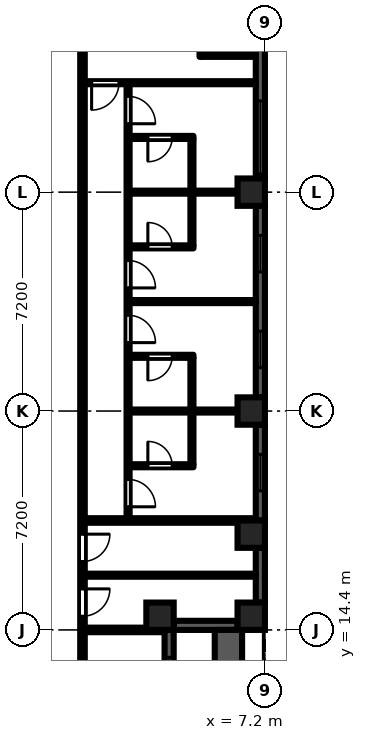
"""IFC4 building model, lengths in metres.
Left out: names, types, materials, properties, quantities, classifications, styles, units other than length and angle.
Written with IfcOpenShell. Run it as: python <this file> out.ifc"""

import sys

from ifc_helpers import new_model, si_unit, direction, frame, frame_2d, origin, origin_2d, place, context, subcontext, project, spatial, rectangle, extrude, element, fill, save


model = new_model("IFC4")
c1 = context("Model", 3, precision=1e-05, world=origin(), true_north=direction((0.0, 1.0)))
c2 = subcontext(c1, "Body", "Model", "MODEL_VIEW")
j1 = project(units=[si_unit("LENGTHUNIT", "METRE"), si_unit("PLANEANGLEUNIT", "RADIAN")], contexts=[c1])
p1 = place(None, origin())
s1 = spatial("IfcSite", under=j1, at=p1, CompositionType="ELEMENT")
p2 = place(p1, origin())
s2 = spatial("IfcBuilding", under=s1, at=p2, CompositionType="ELEMENT")
p3 = place(p2, frame((0.0, 0.0, 53.7)))
s3 = spatial("IfcBuildingStorey", under=s2, at=p3, CompositionType="ELEMENT", Elevation=53.7)
for number, where, z_axis, x_axis in (
    (1, (3.75, 14.85, 0.0), (0.0, 0.0, 1.0), (1.0, 0.0, 0.0)),
    (2, (6.75, 14.85, 0.0), (0.0, 0.0, 1.0), (1.0, 0.0, 0.0)),
    (3, (6.75, 17.55, 0.0), (0.0, 0.0, 1.0), (1.0, 0.0, 0.0)),
    (4, (6.75, 21.6, 0.0), (0.0, 0.0, 1.0), (1.0, 0.0, 0.0)),
    (5, (6.75, 28.8, 0.0), (0.0, 0.0, 1.0), (1.0, 0.0, 0.0)),
):
    element("IfcColumn", number, at=place(p3, frame(where, z_axis=z_axis, x_axis=x_axis)), inside=s3, PredefinedType="COLUMN", context=c2, shape_type="SweptSolid", body=[
        extrude(rectangle(XDim=0.9, YDim=0.9, at=origin_2d()), origin(), (0.0, 0.0, 1.0), 3.0),
    ])
p4 = place(p3, frame((4.05, 7.2, 0.0), z_axis=(0.0, 0.0, 1.0), x_axis=(0.0, 1.0, 0.0)))
e6 = element("IfcWall", 6, at=p4, inside=s3, PredefinedType="SOLIDWALL", context=c2, shape_type="SweptSolid", body=[
    extrude(rectangle(XDim=7.2, YDim=0.3, at=frame_2d((3.6, 0.0))), origin(), (0.0, 0.0, 1.0), 2.1),
])
p5 = place(p4, frame((3.0, 0.0, 0.0)))
e7 = element("IfcOpeningElement", 7, at=p5, cuts=e6, PredefinedType="OPENING", context=c2, shape_type="SweptSolid", body=[
    extrude(rectangle(XDim=1.2, YDim=2.05, at=frame_2d((0.6, 1.025))), frame((0.0, 0.16, 0.0), z_axis=(0.0, -1.0, 0.0), x_axis=(1.0, 0.0, 0.0)), (0.0, 0.0, 1.0), 0.32),
])
p6 = place(p4, frame((0.9, 0.0, 0.2)))
e8 = element("IfcOpeningElement", 8, at=p6, cuts=e6, PredefinedType="OPENING", context=c2, shape_type="SweptSolid", body=[
    extrude(rectangle(XDim=1.8, YDim=1.85, at=frame_2d((0.9, 0.925))), frame((0.0, 0.16, 0.0), z_axis=(0.0, -1.0, 0.0), x_axis=(1.0, 0.0, 0.0)), (0.0, 0.0, 1.0), 0.32),
])
p7 = place(p4, frame((4.5, 0.0, 0.2)))
e9 = element("IfcOpeningElement", 9, at=p7, cuts=e6, PredefinedType="OPENING", context=c2, shape_type="SweptSolid", body=[
    extrude(rectangle(XDim=1.8, YDim=1.85, at=frame_2d((0.9, 0.925))), frame((0.0, 0.16, 0.0), z_axis=(0.0, -1.0, 0.0), x_axis=(1.0, 0.0, 0.0)), (0.0, 0.0, 1.0), 0.32),
])
p8 = place(p3, frame((4.2, 14.55, 0.0), z_axis=(0.0, 0.0, 1.0), x_axis=(1.0, 0.0, 0.0)))
e10 = element("IfcWall", 10, at=p8, inside=s3, PredefinedType="SOLIDWALL", context=c2, shape_type="SweptSolid", body=[
    extrude(rectangle(XDim=2.1, YDim=0.3, at=frame_2d((1.05, 0.0))), origin(), (0.0, 0.0, 1.0), 2.1),
])
p9 = place(p3, frame((7.05, 15.3, 0.0), z_axis=(0.0, 0.0, 1.0), x_axis=(0.0, 1.0, 0.0)))
e11 = element("IfcWall", 11, at=p9, inside=s3, PredefinedType="SOLIDWALL", context=c2, shape_type="SweptSolid", body=[
    extrude(rectangle(XDim=1.8, YDim=0.3, at=frame_2d((0.9, 0.0))), origin(), (0.0, 0.0, 1.0), 2.1),
])
p10 = place(p3, frame((7.05, 18.0, 0.0), z_axis=(0.0, 0.0, 1.0), x_axis=(0.0, 1.0, 0.0)))
e12 = element("IfcWall", 12, at=p10, inside=s3, PredefinedType="SOLIDWALL", context=c2, shape_type="SweptSolid", body=[
    extrude(rectangle(XDim=3.15, YDim=0.3, at=frame_2d((1.575, 0.0))), origin(), (0.0, 0.0, 1.0), 2.1),
])
p11 = place(p10, frame((0.975, 0.0, 0.2)))
e13 = element("IfcOpeningElement", 13, at=p11, cuts=e12, PredefinedType="OPENING", context=c2, shape_type="SweptSolid", body=[
    extrude(rectangle(XDim=1.2, YDim=1.85, at=frame_2d((0.6, 0.925))), frame((0.0, 0.16, 0.0), z_axis=(0.0, -1.0, 0.0), x_axis=(1.0, 0.0, 0.0)), (0.0, 0.0, 1.0), 0.32),
])
p12 = place(p3, frame((7.05, 22.05, 0.0), z_axis=(0.0, 0.0, 1.0), x_axis=(0.0, 1.0, 0.0)))
e14 = element("IfcWall", 14, at=p12, inside=s3, PredefinedType="SOLIDWALL", context=c2, shape_type="SweptSolid", body=[
    extrude(rectangle(XDim=6.3, YDim=0.3, at=frame_2d((3.15, 0.0))), origin(), (0.0, 0.0, 1.0), 2.1),
])
p13 = place(p12, frame((0.975, 0.0, 0.2)))
e15 = element("IfcOpeningElement", 15, at=p13, cuts=e14, PredefinedType="OPENING", context=c2, shape_type="SweptSolid", body=[
    extrude(rectangle(XDim=1.2, YDim=1.85, at=frame_2d((0.6, 0.925))), frame((0.0, 0.16, 0.0), z_axis=(0.0, -1.0, 0.0), x_axis=(1.0, 0.0, 0.0)), (0.0, 0.0, 1.0), 0.32),
])
p14 = place(p12, frame((4.125, 0.0, 0.2)))
e16 = element("IfcOpeningElement", 16, at=p14, cuts=e14, PredefinedType="OPENING", context=c2, shape_type="SweptSolid", body=[
    extrude(rectangle(XDim=1.2, YDim=1.85, at=frame_2d((0.6, 0.925))), frame((0.0, 0.16, 0.0), z_axis=(0.0, -1.0, 0.0), x_axis=(1.0, 0.0, 0.0)), (0.0, 0.0, 1.0), 0.32),
])
p15 = place(p3, frame((7.05, 29.25, 0.0), z_axis=(0.0, 0.0, 1.0), x_axis=(0.0, 1.0, 0.0)))
e17 = element("IfcWall", 17, at=p15, inside=s3, PredefinedType="SOLIDWALL", context=c2, shape_type="SweptSolid", body=[
    extrude(rectangle(XDim=6.3, YDim=0.3, at=frame_2d((3.15, 0.0))), origin(), (0.0, 0.0, 1.0), 2.1),
])
p16 = place(p15, frame((0.15, 0.0, 0.2)))
e18 = element("IfcOpeningElement", 18, at=p16, cuts=e17, PredefinedType="OPENING", context=c2, shape_type="SweptSolid", body=[
    extrude(rectangle(XDim=2.4, YDim=1.85, at=frame_2d((1.2, 0.925))), frame((0.0, 0.16, 0.0), z_axis=(0.0, -1.0, 0.0), x_axis=(1.0, 0.0, 0.0)), (0.0, 0.0, 1.0), 0.32),
])
p17 = place(p3, frame((6.0, 7.2, 0.0), z_axis=(0.0, 0.0, 1.0), x_axis=(0.0, 1.0, 0.0)))
e19 = element("IfcWall", 19, at=p17, inside=s3, PredefinedType="PARAPET", context=c2, shape_type="SweptSolid", body=[
    extrude(rectangle(XDim=7.2, YDim=0.9, at=frame_2d((3.6, 0.0))), origin(), (0.0, 0.0, 1.0), 0.8),
])
p18 = place(p3, frame((1.2, 1.125, 0.0), z_axis=(0.0, 0.0, 1.0), x_axis=(0.0, 1.0, 0.0)))
e20 = element("IfcWall", 20, at=p18, inside=s3, PredefinedType="PARTITIONING", context=c2, shape_type="SweptSolid", body=[
    extrude(rectangle(XDim=35.375, YDim=0.15, at=frame_2d((17.688, 0.0))), origin(), (0.0, 0.0, 1.0), 2.575),
])
p19 = place(p18, frame((2.625, 0.0, 0.0)))
e21 = element("IfcOpeningElement", 21, at=p19, cuts=e20, PredefinedType="OPENING", context=c2, shape_type="SweptSolid", body=[
    extrude(rectangle(XDim=0.9, YDim=2.1, at=frame_2d((0.45, 1.05))), frame((0.0, 0.085, 0.0), z_axis=(0.0, -1.0, 0.0), x_axis=(1.0, 0.0, 0.0)), (0.0, 0.0, 1.0), 0.17),
])
p20 = place(p18, frame((7.425, 0.0, 0.0)))
e22 = element("IfcOpeningElement", 22, at=p20, cuts=e20, PredefinedType="OPENING", context=c2, shape_type="SweptSolid", body=[
    extrude(rectangle(XDim=0.9, YDim=2.1, at=frame_2d((0.45, 1.05))), frame((0.0, 0.085, 0.0), z_axis=(0.0, -1.0, 0.0), x_axis=(1.0, 0.0, 0.0)), (0.0, 0.0, 1.0), 0.17),
])
p21 = place(p18, frame((13.725, 0.0, 0.0)))
e23 = element("IfcOpeningElement", 23, at=p21, cuts=e20, PredefinedType="OPENING", context=c2, shape_type="SweptSolid", body=[
    extrude(rectangle(XDim=0.9, YDim=2.1, at=frame_2d((0.45, 1.05))), frame((0.0, 0.085, 0.0), z_axis=(0.0, -1.0, 0.0), x_axis=(1.0, 0.0, 0.0)), (0.0, 0.0, 1.0), 0.17),
])
p22 = place(p18, frame((15.525, 0.0, 0.0)))
e24 = element("IfcOpeningElement", 24, at=p22, cuts=e20, PredefinedType="OPENING", context=c2, shape_type="SweptSolid", body=[
    extrude(rectangle(XDim=0.9, YDim=2.1, at=frame_2d((0.45, 1.05))), frame((0.0, 0.085, 0.0), z_axis=(0.0, -1.0, 0.0), x_axis=(1.0, 0.0, 0.0)), (0.0, 0.0, 1.0), 0.17),
])
p23 = place(p18, frame((32.825, 0.0, 0.0)))
e25 = element("IfcOpeningElement", 25, at=p23, cuts=e20, PredefinedType="OPENING", context=c2, shape_type="SweptSolid", body=[
    extrude(rectangle(XDim=1.0, YDim=2.1, at=frame_2d((0.5, 1.05))), frame((0.0, 0.085, 0.0), z_axis=(0.0, -1.0, 0.0), x_axis=(1.0, 0.0, 0.0)), (0.0, 0.0, 1.0), 0.17),
])
p24 = place(p3, frame((1.275, 14.4, 0.0), z_axis=(0.0, 0.0, 1.0), x_axis=(1.0, 0.0, 0.0)))
e26 = element("IfcWall", 26, at=p24, inside=s3, PredefinedType="PARTITIONING", context=c2, shape_type="SweptSolid", body=[
    extrude(rectangle(XDim=2.625, YDim=0.15, at=frame_2d((1.312, 0.0))), origin(), (0.0, 0.0, 1.0), 2.575),
])
p25 = place(p3, frame((1.275, 16.2, 0.0), z_axis=(0.0, 0.0, 1.0), x_axis=(1.0, 0.0, 0.0)))
e27 = element("IfcWall", 27, at=p25, inside=s3, PredefinedType="PARTITIONING", context=c2, shape_type="SweptSolid", body=[
    extrude(rectangle(XDim=5.625, YDim=0.1, at=frame_2d((2.812, 0.0))), origin(), (0.0, 0.0, 1.0), 2.575),
])
p26 = place(p3, frame((1.275, 18.0, 0.0), z_axis=(0.0, 0.0, 1.0), x_axis=(1.0, 0.0, 0.0)))
e28 = element("IfcWall", 28, at=p26, inside=s3, PredefinedType="PARTITIONING", context=c2, shape_type="SweptSolid", body=[
    extrude(rectangle(XDim=5.625, YDim=0.15, at=frame_2d((2.812, 0.0))), origin(), (0.0, 0.0, 1.0), 2.575),
])
p27 = place(p3, frame((1.275, 32.4, 0.0), z_axis=(0.0, 0.0, 1.0), x_axis=(1.0, 0.0, 0.0)))
e29 = element("IfcWall", 29, at=p27, inside=s3, PredefinedType="PARTITIONING", context=c2, shape_type="SweptSolid", body=[
    extrude(rectangle(XDim=5.625, YDim=0.1, at=frame_2d((2.812, 0.0))), origin(), (0.0, 0.0, 1.0), 2.575),
])
p28 = place(p27, frame((0.225, 0.0, 0.0)))
e30 = element("IfcOpeningElement", 30, at=p28, cuts=e29, PredefinedType="OPENING", context=c2, shape_type="SweptSolid", body=[
    extrude(rectangle(XDim=0.9, YDim=2.1, at=frame_2d((0.45, 1.05))), frame((0.0, 0.06, 0.0), z_axis=(0.0, -1.0, 0.0), x_axis=(1.0, 0.0, 0.0)), (0.0, 0.0, 1.0), 0.12),
])
p29 = place(p3, frame((2.7, 18.075, 0.0), z_axis=(0.0, 0.0, 1.0), x_axis=(0.0, 1.0, 0.0)))
e31 = element("IfcWall", 31, at=p29, inside=s3, PredefinedType="PARTITIONING", context=c2, shape_type="SweptSolid", body=[
    extrude(rectangle(XDim=14.275, YDim=0.1, at=frame_2d((7.138, 0.0))), origin(), (0.0, 0.0, 1.0), 2.575),
])
p30 = place(p29, frame((0.375, 0.0, 0.0)))
e32 = element("IfcOpeningElement", 32, at=p30, cuts=e31, PredefinedType="OPENING", context=c2, shape_type="SweptSolid", body=[
    extrude(rectangle(XDim=0.9, YDim=2.1, at=frame_2d((0.45, 1.05))), frame((0.0, 0.06, 0.0), z_axis=(0.0, -1.0, 0.0), x_axis=(1.0, 0.0, 0.0)), (0.0, 0.0, 1.0), 0.12),
])
p31 = place(p29, frame((5.775, 0.0, 0.0)))
e33 = element("IfcOpeningElement", 33, at=p31, cuts=e31, PredefinedType="OPENING", context=c2, shape_type="SweptSolid", body=[
    extrude(rectangle(XDim=0.9, YDim=2.1, at=frame_2d((0.45, 1.05))), frame((0.0, 0.06, 0.0), z_axis=(0.0, -1.0, 0.0), x_axis=(1.0, 0.0, 0.0)), (0.0, 0.0, 1.0), 0.12),
])
p32 = place(p29, frame((7.575, 0.0, 0.0)))
e34 = element("IfcOpeningElement", 34, at=p32, cuts=e31, PredefinedType="OPENING", context=c2, shape_type="SweptSolid", body=[
    extrude(rectangle(XDim=0.9, YDim=2.1, at=frame_2d((0.45, 1.05))), frame((0.0, 0.06, 0.0), z_axis=(0.0, -1.0, 0.0), x_axis=(1.0, 0.0, 0.0)), (0.0, 0.0, 1.0), 0.12),
])
p33 = place(p29, frame((12.975, 0.0, 0.0)))
e35 = element("IfcOpeningElement", 35, at=p33, cuts=e31, PredefinedType="OPENING", context=c2, shape_type="SweptSolid", body=[
    extrude(rectangle(XDim=0.9, YDim=2.1, at=frame_2d((0.45, 1.05))), frame((0.0, 0.06, 0.0), z_axis=(0.0, -1.0, 0.0), x_axis=(1.0, 0.0, 0.0)), (0.0, 0.0, 1.0), 0.12),
])
p34 = place(p3, frame((2.75, 19.8, 0.0), z_axis=(0.0, 0.0, 1.0), x_axis=(1.0, 0.0, 0.0)))
e36 = element("IfcWall", 36, at=p34, inside=s3, PredefinedType="PARTITIONING", context=c2, shape_type="SweptSolid", body=[
    extrude(rectangle(XDim=2.1, YDim=0.1, at=frame_2d((1.05, 0.0))), origin(), (0.0, 0.0, 1.0), 2.575),
])
p35 = place(p34, frame((0.6, 0.0, 0.0)))
e37 = element("IfcOpeningElement", 37, at=p35, cuts=e36, PredefinedType="OPENING", context=c2, shape_type="SweptSolid", body=[
    extrude(rectangle(XDim=0.8, YDim=2.1, at=frame_2d((0.4, 1.05))), frame((0.0, 0.06, 0.0), z_axis=(0.0, -1.0, 0.0), x_axis=(1.0, 0.0, 0.0)), (0.0, 0.0, 1.0), 0.12),
])
p36 = place(p3, frame((2.75, 21.6, 0.0), z_axis=(0.0, 0.0, 1.0), x_axis=(1.0, 0.0, 0.0)))
e38 = element("IfcWall", 38, at=p36, inside=s3, PredefinedType="PARTITIONING", context=c2, shape_type="SweptSolid", body=[
    extrude(rectangle(XDim=4.15, YDim=0.1, at=frame_2d((2.075, 0.0))), origin(), (0.0, 0.0, 1.0), 2.575),
])
p37 = place(p3, frame((2.75, 23.4, 0.0), z_axis=(0.0, 0.0, 1.0), x_axis=(1.0, 0.0, 0.0)))
e39 = element("IfcWall", 39, at=p37, inside=s3, PredefinedType="PARTITIONING", context=c2, shape_type="SweptSolid", body=[
    extrude(rectangle(XDim=2.1, YDim=0.1, at=frame_2d((1.05, 0.0))), origin(), (0.0, 0.0, 1.0), 2.575),
])
p38 = place(p37, frame((0.6, 0.0, 0.0)))
e40 = element("IfcOpeningElement", 40, at=p38, cuts=e39, PredefinedType="OPENING", context=c2, shape_type="SweptSolid", body=[
    extrude(rectangle(XDim=0.8, YDim=2.1, at=frame_2d((0.4, 1.05))), frame((0.0, 0.06, 0.0), z_axis=(0.0, -1.0, 0.0), x_axis=(1.0, 0.0, 0.0)), (0.0, 0.0, 1.0), 0.12),
])
p39 = place(p3, frame((2.75, 25.2, 0.0), z_axis=(0.0, 0.0, 1.0), x_axis=(1.0, 0.0, 0.0)))
e41 = element("IfcWall", 41, at=p39, inside=s3, PredefinedType="PARTITIONING", context=c2, shape_type="SweptSolid", body=[
    extrude(rectangle(XDim=4.15, YDim=0.1, at=frame_2d((2.075, 0.0))), origin(), (0.0, 0.0, 1.0), 2.575),
])
p40 = place(p3, frame((2.75, 27.0, 0.0), z_axis=(0.0, 0.0, 1.0), x_axis=(1.0, 0.0, 0.0)))
e42 = element("IfcWall", 42, at=p40, inside=s3, PredefinedType="PARTITIONING", context=c2, shape_type="SweptSolid", body=[
    extrude(rectangle(XDim=2.1, YDim=0.1, at=frame_2d((1.05, 0.0))), origin(), (0.0, 0.0, 1.0), 2.575),
])
p41 = place(p40, frame((0.6, 0.0, 0.0)))
e43 = element("IfcOpeningElement", 43, at=p41, cuts=e42, PredefinedType="OPENING", context=c2, shape_type="SweptSolid", body=[
    extrude(rectangle(XDim=0.8, YDim=2.1, at=frame_2d((0.4, 1.05))), frame((0.0, 0.06, 0.0), z_axis=(0.0, -1.0, 0.0), x_axis=(1.0, 0.0, 0.0)), (0.0, 0.0, 1.0), 0.12),
])
p42 = place(p3, frame((2.75, 28.8, 0.0), z_axis=(0.0, 0.0, 1.0), x_axis=(1.0, 0.0, 0.0)))
e44 = element("IfcWall", 44, at=p42, inside=s3, PredefinedType="PARTITIONING", context=c2, shape_type="SweptSolid", body=[
    extrude(rectangle(XDim=4.15, YDim=0.1, at=frame_2d((2.075, 0.0))), origin(), (0.0, 0.0, 1.0), 2.575),
])
p43 = place(p3, frame((2.75, 30.6, 0.0), z_axis=(0.0, 0.0, 1.0), x_axis=(1.0, 0.0, 0.0)))
e45 = element("IfcWall", 45, at=p43, inside=s3, PredefinedType="PARTITIONING", context=c2, shape_type="SweptSolid", body=[
    extrude(rectangle(XDim=2.1, YDim=0.1, at=frame_2d((1.05, 0.0))), origin(), (0.0, 0.0, 1.0), 2.575),
])
p44 = place(p43, frame((0.6, 0.0, 0.0)))
e46 = element("IfcOpeningElement", 46, at=p44, cuts=e45, PredefinedType="OPENING", context=c2, shape_type="SweptSolid", body=[
    extrude(rectangle(XDim=0.8, YDim=2.1, at=frame_2d((0.4, 1.05))), frame((0.0, 0.06, 0.0), z_axis=(0.0, -1.0, 0.0), x_axis=(1.0, 0.0, 0.0)), (0.0, 0.0, 1.0), 0.12),
])
for number, where, z_axis, x_axis in (
    (47, (4.8, 19.85, 0.0), (0.0, 0.0, 1.0), (0.0, 1.0, 0.0)),
    (48, (4.8, 27.05, 0.0), (0.0, 0.0, 1.0), (0.0, 1.0, 0.0)),
):
    element("IfcWall", number, at=place(p3, frame(where, z_axis=z_axis, x_axis=x_axis)), inside=s3, PredefinedType="PARTITIONING", context=c2, shape_type="SweptSolid", body=[
        extrude(rectangle(XDim=3.5, YDim=0.1, at=frame_2d((1.75, 0.0))), origin(), (0.0, 0.0, 1.0), 2.575),
    ])
p45 = place(p3, frame((5.1, 33.25, 0.0), z_axis=(0.0, 0.0, 1.0), x_axis=(0.0, 1.0, 0.0)))
e49 = element("IfcWall", 49, at=p45, inside=s3, PredefinedType="PARTITIONING", context=c2, shape_type="SweptSolid", body=[
    extrude(rectangle(XDim=1.9, YDim=0.1, at=frame_2d((0.95, 0.0))), origin(), (0.0, 0.0, 1.0), 2.575),
])
p46 = place(p45, frame((0.55, 0.0, 0.0)))
e50 = element("IfcOpeningElement", 50, at=p46, cuts=e49, PredefinedType="OPENING", context=c2, shape_type="SweptSolid", body=[
    extrude(rectangle(XDim=0.8, YDim=2.1, at=frame_2d((0.4, 1.05))), frame((0.0, 0.06, 0.0), z_axis=(0.0, -1.0, 0.0), x_axis=(1.0, 0.0, 0.0)), (0.0, 0.0, 1.0), 0.12),
])
p47 = place(p3, frame((5.15, 33.3, 0.0), z_axis=(0.0, 0.0, 1.0), x_axis=(1.0, 0.0, 0.0)))
e51 = element("IfcWall", 51, at=p47, inside=s3, PredefinedType="PARTITIONING", context=c2, shape_type="SweptSolid", body=[
    extrude(rectangle(XDim=1.75, YDim=0.1, at=frame_2d((0.875, 0.0))), origin(), (0.0, 0.0, 1.0), 2.575),
])
p48 = place(p7, origin())
e52 = element("IfcWindow", 52, at=p48, inside=s3, PartitioningType="SINGLE_PANEL", PredefinedType="WINDOW", context=c2, shape_type="SweptSolid", body=[
    extrude(rectangle(XDim=1.8, YDim=1.85, at=frame_2d((0.9, 0.925))), frame((0.0, 0.03, 0.0), z_axis=(0.0, -1.0, 0.0), x_axis=(1.0, 0.0, 0.0)), (0.0, 0.0, 1.0), 0.06),
])
fill(e9, e52)
p49 = place(p11, origin())
e53 = element("IfcWindow", 53, at=p49, inside=s3, PartitioningType="SINGLE_PANEL", PredefinedType="WINDOW", context=c2, shape_type="SweptSolid", body=[
    extrude(rectangle(XDim=1.2, YDim=1.85, at=frame_2d((0.6, 0.925))), frame((0.0, 0.03, 0.0), z_axis=(0.0, -1.0, 0.0), x_axis=(1.0, 0.0, 0.0)), (0.0, 0.0, 1.0), 0.06),
])
fill(e13, e53)
p50 = place(p13, origin())
e54 = element("IfcWindow", 54, at=p50, inside=s3, PartitioningType="SINGLE_PANEL", PredefinedType="WINDOW", context=c2, shape_type="SweptSolid", body=[
    extrude(rectangle(XDim=1.2, YDim=1.85, at=frame_2d((0.6, 0.925))), frame((0.0, 0.03, 0.0), z_axis=(0.0, -1.0, 0.0), x_axis=(1.0, 0.0, 0.0)), (0.0, 0.0, 1.0), 0.06),
])
fill(e15, e54)
p51 = place(p14, origin())
e55 = element("IfcWindow", 55, at=p51, inside=s3, PartitioningType="SINGLE_PANEL", PredefinedType="WINDOW", context=c2, shape_type="SweptSolid", body=[
    extrude(rectangle(XDim=1.2, YDim=1.85, at=frame_2d((0.6, 0.925))), frame((0.0, 0.03, 0.0), z_axis=(0.0, -1.0, 0.0), x_axis=(1.0, 0.0, 0.0)), (0.0, 0.0, 1.0), 0.06),
])
fill(e16, e55)
p52 = place(p16, origin())
e56 = element("IfcWindow", 56, at=p52, inside=s3, PartitioningType="SINGLE_PANEL", PredefinedType="WINDOW", context=c2, shape_type="SweptSolid", body=[
    extrude(rectangle(XDim=2.4, YDim=1.85, at=frame_2d((1.2, 0.925))), frame((0.0, 0.03, 0.0), z_axis=(0.0, -1.0, 0.0), x_axis=(1.0, 0.0, 0.0)), (0.0, 0.0, 1.0), 0.06),
])
fill(e18, e56)
p53 = place(p21, frame((0.9, 0.0, 0.0), z_axis=(0.0, 0.0, 1.0), x_axis=(-1.0, 0.0, 0.0)))
e57 = element("IfcDoor", 57, at=p53, inside=s3, OperationType="SINGLE_SWING_LEFT", PredefinedType="DOOR", context=c2, shape_type="SweptSolid", body=[
    extrude(rectangle(XDim=0.9, YDim=2.1, at=frame_2d((0.45, 1.05))), frame((0.0, 0.025, 0.0), z_axis=(0.0, -1.0, 0.0), x_axis=(1.0, 0.0, 0.0)), (0.0, 0.0, 1.0), 0.05),
])
fill(e23, e57)
p54 = place(p22, frame((0.9, 0.0, 0.0), z_axis=(0.0, 0.0, 1.0), x_axis=(-1.0, 0.0, 0.0)))
e58 = element("IfcDoor", 58, at=p54, inside=s3, OperationType="SINGLE_SWING_LEFT", PredefinedType="DOOR", context=c2, shape_type="SweptSolid", body=[
    extrude(rectangle(XDim=0.9, YDim=2.1, at=frame_2d((0.45, 1.05))), frame((0.0, 0.025, 0.0), z_axis=(0.0, -1.0, 0.0), x_axis=(1.0, 0.0, 0.0)), (0.0, 0.0, 1.0), 0.05),
])
fill(e24, e58)
p55 = place(p28, frame((0.9, 0.0, 0.0), z_axis=(0.0, 0.0, 1.0), x_axis=(-1.0, 0.0, 0.0)))
e59 = element("IfcDoor", 59, at=p55, inside=s3, OperationType="SINGLE_SWING_RIGHT", PredefinedType="DOOR", context=c2, shape_type="SweptSolid", body=[
    extrude(rectangle(XDim=0.9, YDim=2.1, at=frame_2d((0.45, 1.05))), frame((0.0, 0.025, 0.0), z_axis=(0.0, -1.0, 0.0), x_axis=(1.0, 0.0, 0.0)), (0.0, 0.0, 1.0), 0.05),
])
fill(e30, e59)
p56 = place(p30, frame((0.9, 0.0, 0.0), z_axis=(0.0, 0.0, 1.0), x_axis=(-1.0, 0.0, 0.0)))
e60 = element("IfcDoor", 60, at=p56, inside=s3, OperationType="SINGLE_SWING_RIGHT", PredefinedType="DOOR", context=c2, shape_type="SweptSolid", body=[
    extrude(rectangle(XDim=0.9, YDim=2.1, at=frame_2d((0.45, 1.05))), frame((0.0, 0.025, 0.0), z_axis=(0.0, -1.0, 0.0), x_axis=(1.0, 0.0, 0.0)), (0.0, 0.0, 1.0), 0.05),
])
fill(e32, e60)
p57 = place(p31, frame((0.9, 0.0, 0.0), z_axis=(0.0, 0.0, 1.0), x_axis=(-1.0, 0.0, 0.0)))
e61 = element("IfcDoor", 61, at=p57, inside=s3, OperationType="SINGLE_SWING_RIGHT", PredefinedType="DOOR", context=c2, shape_type="SweptSolid", body=[
    extrude(rectangle(XDim=0.9, YDim=2.1, at=frame_2d((0.45, 1.05))), frame((0.0, 0.025, 0.0), z_axis=(0.0, -1.0, 0.0), x_axis=(1.0, 0.0, 0.0)), (0.0, 0.0, 1.0), 0.05),
])
fill(e33, e61)
p58 = place(p32, frame((0.9, 0.0, 0.0), z_axis=(0.0, 0.0, 1.0), x_axis=(-1.0, 0.0, 0.0)))
e62 = element("IfcDoor", 62, at=p58, inside=s3, OperationType="SINGLE_SWING_RIGHT", PredefinedType="DOOR", context=c2, shape_type="SweptSolid", body=[
    extrude(rectangle(XDim=0.9, YDim=2.1, at=frame_2d((0.45, 1.05))), frame((0.0, 0.025, 0.0), z_axis=(0.0, -1.0, 0.0), x_axis=(1.0, 0.0, 0.0)), (0.0, 0.0, 1.0), 0.05),
])
fill(e34, e62)
p59 = place(p33, frame((0.9, 0.0, 0.0), z_axis=(0.0, 0.0, 1.0), x_axis=(-1.0, 0.0, 0.0)))
e63 = element("IfcDoor", 63, at=p59, inside=s3, OperationType="SINGLE_SWING_RIGHT", PredefinedType="DOOR", context=c2, shape_type="SweptSolid", body=[
    extrude(rectangle(XDim=0.9, YDim=2.1, at=frame_2d((0.45, 1.05))), frame((0.0, 0.025, 0.0), z_axis=(0.0, -1.0, 0.0), x_axis=(1.0, 0.0, 0.0)), (0.0, 0.0, 1.0), 0.05),
])
fill(e35, e63)
p60 = place(p35, origin())
e64 = element("IfcDoor", 64, at=p60, inside=s3, OperationType="SINGLE_SWING_LEFT", PredefinedType="DOOR", context=c2, shape_type="SweptSolid", body=[
    extrude(rectangle(XDim=0.8, YDim=2.1, at=frame_2d((0.4, 1.05))), frame((0.0, 0.025, 0.0), z_axis=(0.0, -1.0, 0.0), x_axis=(1.0, 0.0, 0.0)), (0.0, 0.0, 1.0), 0.05),
])
fill(e37, e64)
p61 = place(p38, frame((0.8, 0.0, 0.0), z_axis=(0.0, 0.0, 1.0), x_axis=(-1.0, 0.0, 0.0)))
e65 = element("IfcDoor", 65, at=p61, inside=s3, OperationType="SINGLE_SWING_RIGHT", PredefinedType="DOOR", context=c2, shape_type="SweptSolid", body=[
    extrude(rectangle(XDim=0.8, YDim=2.1, at=frame_2d((0.4, 1.05))), frame((0.0, 0.025, 0.0), z_axis=(0.0, -1.0, 0.0), x_axis=(1.0, 0.0, 0.0)), (0.0, 0.0, 1.0), 0.05),
])
fill(e40, e65)
p62 = place(p41, origin())
e66 = element("IfcDoor", 66, at=p62, inside=s3, OperationType="SINGLE_SWING_LEFT", PredefinedType="DOOR", context=c2, shape_type="SweptSolid", body=[
    extrude(rectangle(XDim=0.8, YDim=2.1, at=frame_2d((0.4, 1.05))), frame((0.0, 0.025, 0.0), z_axis=(0.0, -1.0, 0.0), x_axis=(1.0, 0.0, 0.0)), (0.0, 0.0, 1.0), 0.05),
])
fill(e43, e66)
p63 = place(p44, frame((0.8, 0.0, 0.0), z_axis=(0.0, 0.0, 1.0), x_axis=(-1.0, 0.0, 0.0)))
e67 = element("IfcDoor", 67, at=p63, inside=s3, OperationType="SINGLE_SWING_RIGHT", PredefinedType="DOOR", context=c2, shape_type="SweptSolid", body=[
    extrude(rectangle(XDim=0.8, YDim=2.1, at=frame_2d((0.4, 1.05))), frame((0.0, 0.025, 0.0), z_axis=(0.0, -1.0, 0.0), x_axis=(1.0, 0.0, 0.0)), (0.0, 0.0, 1.0), 0.05),
])
fill(e46, e67)
save(model, sys.argv[1])
